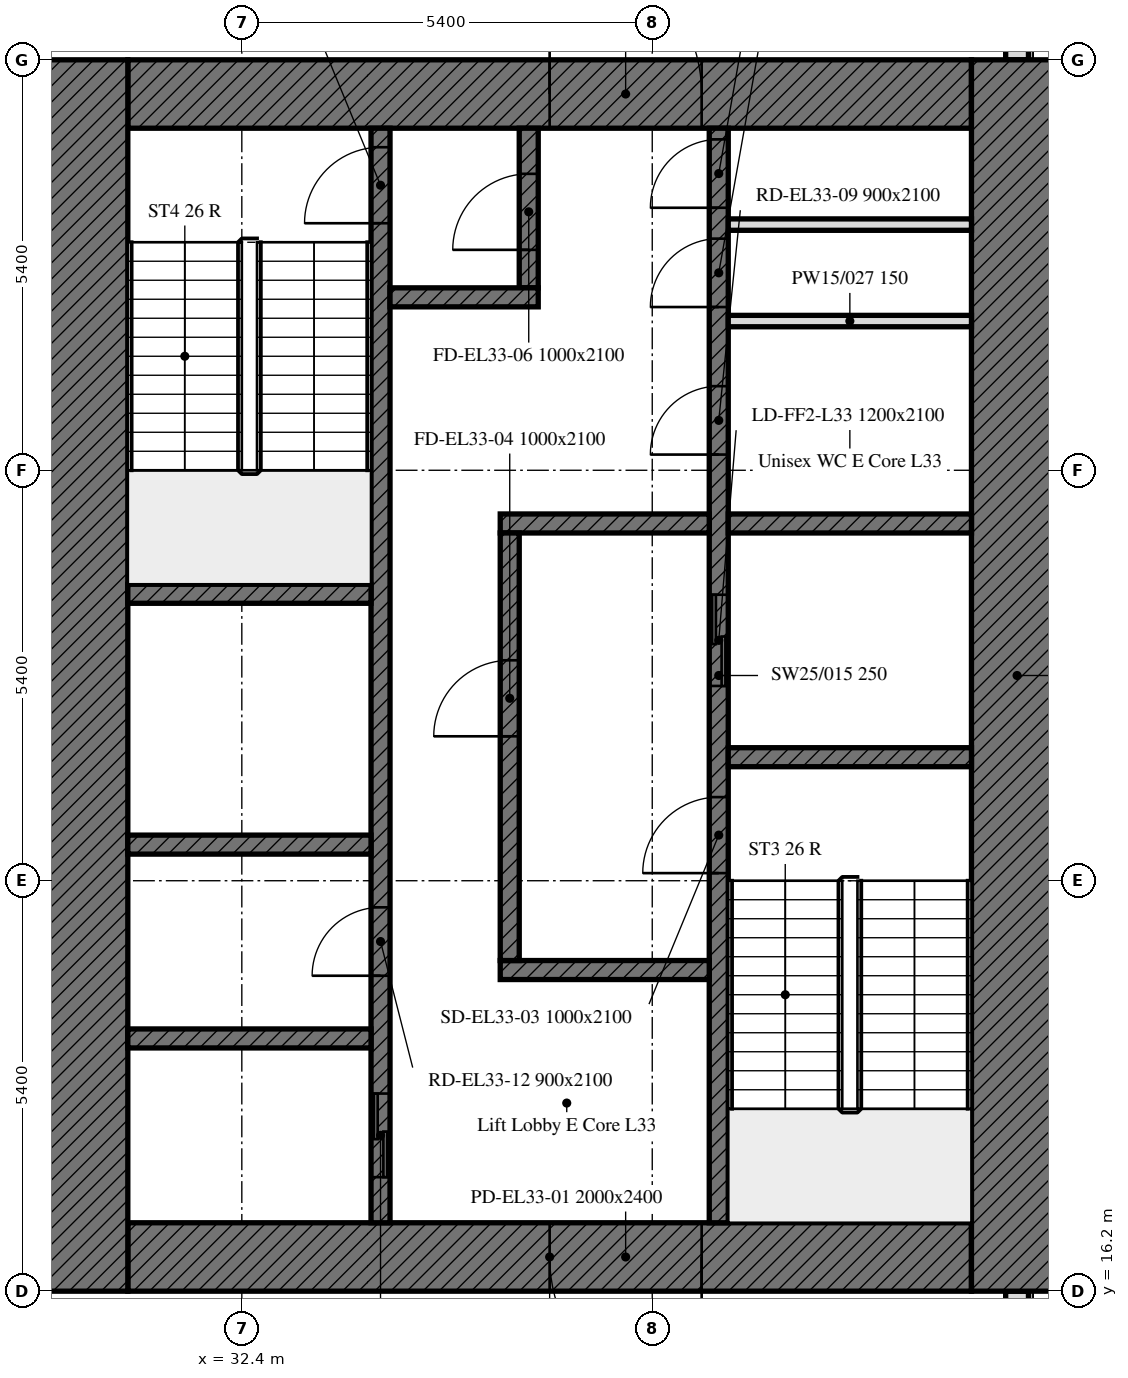
"""IFC4 building model, lengths in metres.
Left out: names, types, materials, properties, quantities, classifications, styles, units other than length and angle.
Written with IfcOpenShell. Run it as: python <this file> out.ifc"""

import sys

from ifc_helpers import new_model, si_unit, direction, frame, frame_2d, origin, place, context, subcontext, project, spatial, rectangle, extrude, element, fill, save


model = new_model("IFC4")
c1 = context("Model", 3, precision=1e-05, world=origin(), true_north=direction((0.0, 1.0)))
c2 = subcontext(c1, "Body", "Model", "MODEL_VIEW")
j1 = project(units=[si_unit("LENGTHUNIT", "METRE"), si_unit("PLANEANGLEUNIT", "RADIAN")], contexts=[c1])
p1 = place(None, origin())
s1 = spatial("IfcSite", under=j1, at=p1, CompositionType="ELEMENT")
p2 = place(p1, origin())
s2 = spatial("IfcBuilding", under=s1, at=p2, CompositionType="ELEMENT")
p3 = place(p2, frame((0.0, 0.0, 143.2)))
s3 = spatial("IfcBuildingStorey", under=s2, at=p3, CompositionType="ELEMENT", Elevation=143.2)
p4 = place(p3, frame((42.6, 10.8, 0.0), z_axis=(0.0, 0.0, 1.0), x_axis=(0.0, 1.0, 0.0)))
e1 = element("IfcWall", 1, at=p4, inside=s3, PredefinedType="SOLIDWALL", context=c2, shape_type="SweptSolid", body=[
    extrude(rectangle(XDim=5.4, YDim=0.3, at=frame_2d((2.7, 0.0))), origin(), (0.0, 0.0, 1.0), 4.5),
])
p5 = place(p4, frame((0.9, 0.0, 0.0)))
e2 = element("IfcOpeningElement", 2, at=p5, cuts=e1, PredefinedType="OPENING", context=c2, shape_type="SweptSolid", body=[
    extrude(rectangle(XDim=1.8, YDim=2.4, at=frame_2d((0.9, 1.2))), frame((0.0, 0.16, 0.0), z_axis=(0.0, -1.0, 0.0), x_axis=(1.0, 0.0, 0.0)), (0.0, 0.0, 1.0), 0.32),
])
p6 = place(p3, frame((42.6, 32.4, 0.0), z_axis=(0.0, 0.0, 1.0), x_axis=(0.0, 1.0, 0.0)))
e3 = element("IfcWall", 3, at=p6, inside=s3, PredefinedType="SOLIDWALL", context=c2, shape_type="SweptSolid", body=[
    extrude(rectangle(XDim=5.214, YDim=0.3, at=frame_2d((2.607, 0.0))), origin(), (0.0, 0.0, 1.0), 4.5),
])
p7 = place(p6, frame((2.7, 0.0, 0.0)))
e4 = element("IfcOpeningElement", 4, at=p7, cuts=e3, PredefinedType="OPENING", context=c2, shape_type="SweptSolid", body=[
    extrude(rectangle(XDim=1.2, YDim=2.4, at=frame_2d((0.6, 1.2))), frame((0.0, 0.16, 0.0), z_axis=(0.0, -1.0, 0.0), x_axis=(1.0, 0.0, 0.0)), (0.0, 0.0, 1.0), 0.32),
])
p8 = place(p3, frame((42.0, 16.65, 0.0), z_axis=(0.0, 0.0, 1.0), x_axis=(-1.0, 0.0, 0.0)))
e5 = element("IfcWall", 5, at=p8, inside=s3, PredefinedType="SOLIDWALL", context=c2, shape_type="SweptSolid", body=[
    extrude(rectangle(XDim=11.1, YDim=0.9, at=frame_2d((5.55, 0.0))), origin(), (0.0, 0.0, 1.0), 4.5),
])
p9 = place(p8, frame((3.55, 0.0, 0.0)))
e6 = element("IfcOpeningElement", 6, at=p9, cuts=e5, PredefinedType="OPENING", context=c2, shape_type="SweptSolid", body=[
    extrude(rectangle(XDim=2.0, YDim=2.4, at=frame_2d((1.0, 1.2))), frame((0.0, 0.45, 0.0), z_axis=(0.0, -1.0, 0.0), x_axis=(1.0, 0.0, 0.0)), (0.0, 0.0, 1.0), 0.9),
])
p10 = place(p3, frame((30.9, 31.95, 0.0), z_axis=(0.0, 0.0, 1.0), x_axis=(1.0, 0.0, 0.0)))
e7 = element("IfcWall", 7, at=p10, inside=s3, PredefinedType="SOLIDWALL", context=c2, shape_type="SweptSolid", body=[
    extrude(rectangle(XDim=11.1, YDim=0.9, at=frame_2d((5.55, 0.0))), origin(), (0.0, 0.0, 1.0), 4.5),
])
p11 = place(p10, frame((5.55, 0.0, 0.0)))
e8 = element("IfcOpeningElement", 8, at=p11, cuts=e7, PredefinedType="OPENING", context=c2, shape_type="SweptSolid", body=[
    extrude(rectangle(XDim=2.0, YDim=2.4, at=frame_2d((1.0, 1.2))), frame((0.0, 0.45, 0.0), z_axis=(0.0, -1.0, 0.0), x_axis=(1.0, 0.0, 0.0)), (0.0, 0.0, 1.0), 0.9),
])
for number, where, z_axis, x_axis in (
    (9, (42.6, 32.4, 0.0), (0.0, 0.0, 1.0), (0.0, -1.0, 0.0)),
    (10, (30.3, 16.2, 0.0), (0.0, 0.0, 1.0), (0.0, 1.0, 0.0)),
):
    element("IfcWall", number, at=place(p3, frame(where, z_axis=z_axis, x_axis=x_axis)), inside=s3, PredefinedType="SOLIDWALL", context=c2, shape_type="SweptSolid", body=[
        extrude(rectangle(XDim=16.2, YDim=1.2, at=frame_2d((8.1, 0.0))), origin(), (0.0, 0.0, 1.0), 4.5),
    ])
p12 = place(p3, frame((38.675, 17.1, 0.0), z_axis=(0.0, 0.0, 1.0), x_axis=(0.0, 1.0, 0.0)))
e11 = element("IfcWall", 11, at=p12, inside=s3, PredefinedType="SOLIDWALL", context=c2, shape_type="SweptSolid", body=[
    extrude(rectangle(XDim=14.4, YDim=0.25, at=frame_2d((7.2, 0.0))), origin(), (0.0, 0.0, 1.0), 4.5),
])
p13 = place(p12, frame((4.6, 0.0, 0.0)))
e12 = element("IfcOpeningElement", 12, at=p13, cuts=e11, PredefinedType="OPENING", context=c2, shape_type="SweptSolid", body=[
    extrude(rectangle(XDim=1.0, YDim=2.1, at=frame_2d((0.5, 1.05))), frame((0.0, 0.125, 0.0), z_axis=(0.0, -1.0, 0.0), x_axis=(1.0, 0.0, 0.0)), (0.0, 0.0, 1.0), 0.25),
])
p14 = place(p12, frame((7.062, 0.0, 0.0)))
e13 = element("IfcOpeningElement", 13, at=p14, cuts=e11, PredefinedType="OPENING", context=c2, shape_type="SweptSolid", body=[
    extrude(rectangle(XDim=1.2, YDim=2.1, at=frame_2d((0.6, 1.05))), frame((0.0, 0.125, 0.0), z_axis=(0.0, -1.0, 0.0), x_axis=(1.0, 0.0, 0.0)), (0.0, 0.0, 1.0), 0.25),
])
p15 = place(p12, frame((10.106, 0.0, 0.0)))
e14 = element("IfcOpeningElement", 14, at=p15, cuts=e11, PredefinedType="OPENING", context=c2, shape_type="SweptSolid", body=[
    extrude(rectangle(XDim=0.9, YDim=2.1, at=frame_2d((0.45, 1.05))), frame((0.0, 0.125, 0.0), z_axis=(0.0, -1.0, 0.0), x_axis=(1.0, 0.0, 0.0)), (0.0, 0.0, 1.0), 0.25),
])
p16 = place(p12, frame((12.048, 0.0, 0.0)))
e15 = element("IfcOpeningElement", 15, at=p16, cuts=e11, PredefinedType="OPENING", context=c2, shape_type="SweptSolid", body=[
    extrude(rectangle(XDim=0.9, YDim=2.1, at=frame_2d((0.45, 1.05))), frame((0.0, 0.125, 0.0), z_axis=(0.0, -1.0, 0.0), x_axis=(1.0, 0.0, 0.0)), (0.0, 0.0, 1.0), 0.25),
])
p17 = place(p12, frame((13.354, 0.0, 0.0)))
e16 = element("IfcOpeningElement", 16, at=p17, cuts=e11, PredefinedType="OPENING", context=c2, shape_type="SweptSolid", body=[
    extrude(rectangle(XDim=0.9, YDim=2.1, at=frame_2d((0.45, 1.05))), frame((0.0, 0.125, 0.0), z_axis=(0.0, -1.0, 0.0), x_axis=(1.0, 0.0, 0.0)), (0.0, 0.0, 1.0), 0.25),
])
p18 = place(p3, frame((34.225, 17.1, 0.0), z_axis=(0.0, 0.0, 1.0), x_axis=(0.0, 1.0, 0.0)))
e17 = element("IfcWall", 17, at=p18, inside=s3, PredefinedType="SOLIDWALL", context=c2, shape_type="SweptSolid", body=[
    extrude(rectangle(XDim=14.4, YDim=0.25, at=frame_2d((7.2, 0.0))), origin(), (0.0, 0.0, 1.0), 4.5),
])
p19 = place(p18, frame((13.15, 0.0, 0.0)))
e18 = element("IfcOpeningElement", 18, at=p19, cuts=e17, PredefinedType="OPENING", context=c2, shape_type="SweptSolid", body=[
    extrude(rectangle(XDim=1.0, YDim=2.1, at=frame_2d((0.5, 1.05))), frame((0.0, 0.125, 0.0), z_axis=(0.0, -1.0, 0.0), x_axis=(1.0, 0.0, 0.0)), (0.0, 0.0, 1.0), 0.25),
])
p20 = place(p18, frame((0.6, 0.0, 0.0)))
e19 = element("IfcOpeningElement", 19, at=p20, cuts=e17, PredefinedType="OPENING", context=c2, shape_type="SweptSolid", body=[
    extrude(rectangle(XDim=1.1, YDim=2.1, at=frame_2d((0.55, 1.05))), frame((0.0, 0.125, 0.0), z_axis=(0.0, -1.0, 0.0), x_axis=(1.0, 0.0, 0.0)), (0.0, 0.0, 1.0), 0.25),
])
p21 = place(p18, frame((3.25, 0.0, 0.0)))
e20 = element("IfcOpeningElement", 20, at=p21, cuts=e17, PredefinedType="OPENING", context=c2, shape_type="SweptSolid", body=[
    extrude(rectangle(XDim=0.9, YDim=2.1, at=frame_2d((0.45, 1.05))), frame((0.0, 0.125, 0.0), z_axis=(0.0, -1.0, 0.0), x_axis=(1.0, 0.0, 0.0)), (0.0, 0.0, 1.0), 0.25),
])
p22 = place(p3, frame((38.8, 23.225, 0.0), z_axis=(0.0, 0.0, 1.0), x_axis=(1.0, 0.0, 0.0)))
e21 = element("IfcWall", 21, at=p22, inside=s3, PredefinedType="SOLIDWALL", context=c2, shape_type="SweptSolid", body=[
    extrude(rectangle(XDim=3.2, YDim=0.25, at=frame_2d((1.6, 0.0))), origin(), (0.0, 0.0, 1.0), 4.5),
])
for number, where, z_axis, x_axis in (
    (22, (30.9, 25.375, 0.0), (0.0, 0.0, 1.0), (1.0, 0.0, 0.0)),
    (23, (30.9, 22.075, 0.0), (0.0, 0.0, 1.0), (1.0, 0.0, 0.0)),
):
    element("IfcWall", number, at=place(p3, frame(where, z_axis=z_axis, x_axis=x_axis)), inside=s3, PredefinedType="SOLIDWALL", context=c2, shape_type="SweptSolid", body=[
        extrude(rectangle(XDim=3.2, YDim=0.25, at=frame_2d((1.6, 0.0))), origin(), (0.0, 0.0, 1.0), 4.5),
    ])
p23 = place(p3, frame((38.8, 26.3, 0.0), z_axis=(0.0, 0.0, 1.0), x_axis=(1.0, 0.0, 0.0)))
e24 = element("IfcWall", 24, at=p23, inside=s3, PredefinedType="SOLIDWALL", context=c2, shape_type="SweptSolid", body=[
    extrude(rectangle(XDim=3.2, YDim=0.25, at=frame_2d((1.6, 0.0))), origin(), (0.0, 0.0, 1.0), 4.5),
])
for number, where, z_axis, x_axis in (
    (25, (35.8, 26.3, 0.0), (0.0, 0.0, 1.0), (1.0, 0.0, 0.0)),
    (26, (35.8, 20.425, 0.0), (0.0, 0.0, 1.0), (1.0, 0.0, 0.0)),
):
    element("IfcWall", number, at=place(p3, frame(where, z_axis=z_axis, x_axis=x_axis)), inside=s3, PredefinedType="SOLIDWALL", context=c2, shape_type="SweptSolid", body=[
        extrude(rectangle(XDim=2.75, YDim=0.25, at=frame_2d((1.375, 0.0))), origin(), (0.0, 0.0, 1.0), 4.5),
    ])
p24 = place(p3, frame((36.175, 29.4, 0.0), z_axis=(0.0, 0.0, 1.0), x_axis=(0.0, 1.0, 0.0)))
e27 = element("IfcWall", 27, at=p24, inside=s3, PredefinedType="SOLIDWALL", context=c2, shape_type="SweptSolid", body=[
    extrude(rectangle(XDim=2.1, YDim=0.25, at=frame_2d((1.05, 0.0))), origin(), (0.0, 0.0, 1.0), 4.5),
])
p25 = place(p24, frame((0.5, 0.0, 0.0)))
e28 = element("IfcOpeningElement", 28, at=p25, cuts=e27, PredefinedType="OPENING", context=c2, shape_type="SweptSolid", body=[
    extrude(rectangle(XDim=1.0, YDim=2.1, at=frame_2d((0.5, 1.05))), frame((0.0, 0.125, 0.0), z_axis=(0.0, -1.0, 0.0), x_axis=(1.0, 0.0, 0.0)), (0.0, 0.0, 1.0), 0.25),
])
p26 = place(p3, frame((34.35, 29.275, 0.0), z_axis=(0.0, 0.0, 1.0), x_axis=(1.0, 0.0, 0.0)))
e29 = element("IfcWall", 29, at=p26, inside=s3, PredefinedType="SOLIDWALL", context=c2, shape_type="SweptSolid", body=[
    extrude(rectangle(XDim=1.95, YDim=0.25, at=frame_2d((0.975, 0.0))), origin(), (0.0, 0.0, 1.0), 4.5),
])
p27 = place(p3, frame((35.925, 20.55, 0.0), z_axis=(0.0, 0.0, 1.0), x_axis=(0.0, 1.0, 0.0)))
e30 = element("IfcWall", 30, at=p27, inside=s3, PredefinedType="SOLIDWALL", context=c2, shape_type="SweptSolid", body=[
    extrude(rectangle(XDim=5.625, YDim=0.25, at=frame_2d((2.812, 0.0))), origin(), (0.0, 0.0, 1.0), 4.5),
])
p28 = place(p27, frame((2.95, 0.0, 0.0)))
e31 = element("IfcOpeningElement", 31, at=p28, cuts=e30, PredefinedType="OPENING", context=c2, shape_type="SweptSolid", body=[
    extrude(rectangle(XDim=1.0, YDim=2.1, at=frame_2d((0.5, 1.05))), frame((0.0, 0.125, 0.0), z_axis=(0.0, -1.0, 0.0), x_axis=(1.0, 0.0, 0.0)), (0.0, 0.0, 1.0), 0.25),
])
p29 = place(p3, frame((30.9, 19.525, 0.0), z_axis=(0.0, 0.0, 1.0), x_axis=(1.0, 0.0, 0.0)))
e32 = element("IfcWall", 32, at=p29, inside=s3, PredefinedType="SOLIDWALL", context=c2, shape_type="SweptSolid", body=[
    extrude(rectangle(XDim=3.2, YDim=0.25, at=frame_2d((1.6, 0.0))), origin(), (0.0, 0.0, 1.0), 4.5),
])
for number, where, z_axis, x_axis in (
    (33, (38.8, 28.963, 0.0), (0.0, 0.0, 1.0), (1.0, 0.0, 0.0)),
    (34, (38.8, 30.232, 0.0), (0.0, 0.0, 1.0), (1.0, 0.0, 0.0)),
):
    element("IfcWall", number, at=place(p3, frame(where, z_axis=z_axis, x_axis=x_axis)), inside=s3, PredefinedType="PARTITIONING", context=c2, shape_type="SweptSolid", body=[
        extrude(rectangle(XDim=3.2, YDim=0.15, at=frame_2d((1.6, 0.0))), origin(), (0.0, 0.0, 1.0), 4.5),
    ])
p30 = place(p9, origin())
e35 = element("IfcDoor", 35, at=p30, inside=s3, OperationType="DOUBLE_DOOR_SINGLE_SWING", PredefinedType="DOOR", context=c2, shape_type="SweptSolid", body=[
    extrude(rectangle(XDim=2.0, YDim=2.4, at=frame_2d((1.0, 1.2))), frame((0.0, 0.025, 0.0), z_axis=(0.0, -1.0, 0.0), x_axis=(1.0, 0.0, 0.0)), (0.0, 0.0, 1.0), 0.05),
])
fill(e6, e35)
p31 = place(p11, origin())
e36 = element("IfcDoor", 36, at=p31, inside=s3, OperationType="DOUBLE_DOOR_SINGLE_SWING", PredefinedType="DOOR", context=c2, shape_type="SweptSolid", body=[
    extrude(rectangle(XDim=2.0, YDim=2.4, at=frame_2d((1.0, 1.2))), frame((0.0, 0.025, 0.0), z_axis=(0.0, -1.0, 0.0), x_axis=(1.0, 0.0, 0.0)), (0.0, 0.0, 1.0), 0.05),
])
fill(e8, e36)
p32 = place(p13, origin())
e37 = element("IfcDoor", 37, at=p32, inside=s3, OperationType="SINGLE_SWING_LEFT", PredefinedType="DOOR", context=c2, shape_type="SweptSolid", body=[
    extrude(rectangle(XDim=1.0, YDim=2.1, at=frame_2d((0.5, 1.05))), frame((0.0, 0.025, 0.0), z_axis=(0.0, -1.0, 0.0), x_axis=(1.0, 0.0, 0.0)), (0.0, 0.0, 1.0), 0.05),
])
fill(e12, e37)
p33 = place(p28, origin())
e38 = element("IfcDoor", 38, at=p33, inside=s3, OperationType="SINGLE_SWING_LEFT", PredefinedType="DOOR", context=c2, shape_type="SweptSolid", body=[
    extrude(rectangle(XDim=1.0, YDim=2.1, at=frame_2d((0.5, 1.05))), frame((0.0, 0.025, 0.0), z_axis=(0.0, -1.0, 0.0), x_axis=(1.0, 0.0, 0.0)), (0.0, 0.0, 1.0), 0.05),
])
fill(e31, e38)
p34 = place(p19, origin())
e39 = element("IfcDoor", 39, at=p34, inside=s3, OperationType="SINGLE_SWING_LEFT", PredefinedType="DOOR", context=c2, shape_type="SweptSolid", body=[
    extrude(rectangle(XDim=1.0, YDim=2.1, at=frame_2d((0.5, 1.05))), frame((0.0, 0.025, 0.0), z_axis=(0.0, -1.0, 0.0), x_axis=(1.0, 0.0, 0.0)), (0.0, 0.0, 1.0), 0.05),
])
fill(e18, e39)
p35 = place(p25, origin())
e40 = element("IfcDoor", 40, at=p35, inside=s3, OperationType="SINGLE_SWING_LEFT", PredefinedType="DOOR", context=c2, shape_type="SweptSolid", body=[
    extrude(rectangle(XDim=1.0, YDim=2.1, at=frame_2d((0.5, 1.05))), frame((0.0, 0.025, 0.0), z_axis=(0.0, -1.0, 0.0), x_axis=(1.0, 0.0, 0.0)), (0.0, 0.0, 1.0), 0.05),
])
fill(e28, e40)
p36 = place(p14, origin())
e41 = element("IfcDoor", 41, at=p36, inside=s3, OperationType="DOUBLE_DOOR_SLIDING", PredefinedType="DOOR", context=c2, shape_type="SweptSolid", body=[
    extrude(rectangle(XDim=1.2, YDim=2.1, at=frame_2d((0.6, 1.05))), frame((0.0, 0.025, 0.0), z_axis=(0.0, -1.0, 0.0), x_axis=(1.0, 0.0, 0.0)), (0.0, 0.0, 1.0), 0.05),
])
fill(e13, e41)
p37 = place(p20, origin())
e42 = element("IfcDoor", 42, at=p37, inside=s3, OperationType="DOUBLE_DOOR_SLIDING", PredefinedType="DOOR", context=c2, shape_type="SweptSolid", body=[
    extrude(rectangle(XDim=1.1, YDim=2.1, at=frame_2d((0.55, 1.05))), frame((0.0, 0.025, 0.0), z_axis=(0.0, -1.0, 0.0), x_axis=(1.0, 0.0, 0.0)), (0.0, 0.0, 1.0), 0.05),
])
fill(e19, e42)
p38 = place(p15, origin())
e43 = element("IfcDoor", 43, at=p38, inside=s3, OperationType="SINGLE_SWING_LEFT", PredefinedType="DOOR", context=c2, shape_type="SweptSolid", body=[
    extrude(rectangle(XDim=0.9, YDim=2.1, at=frame_2d((0.45, 1.05))), frame((0.0, 0.025, 0.0), z_axis=(0.0, -1.0, 0.0), x_axis=(1.0, 0.0, 0.0)), (0.0, 0.0, 1.0), 0.05),
])
fill(e14, e43)
p39 = place(p16, origin())
e44 = element("IfcDoor", 44, at=p39, inside=s3, OperationType="SINGLE_SWING_LEFT", PredefinedType="DOOR", context=c2, shape_type="SweptSolid", body=[
    extrude(rectangle(XDim=0.9, YDim=2.1, at=frame_2d((0.45, 1.05))), frame((0.0, 0.025, 0.0), z_axis=(0.0, -1.0, 0.0), x_axis=(1.0, 0.0, 0.0)), (0.0, 0.0, 1.0), 0.05),
])
fill(e15, e44)
p40 = place(p17, origin())
e45 = element("IfcDoor", 45, at=p40, inside=s3, OperationType="SINGLE_SWING_LEFT", PredefinedType="DOOR", context=c2, shape_type="SweptSolid", body=[
    extrude(rectangle(XDim=0.9, YDim=2.1, at=frame_2d((0.45, 1.05))), frame((0.0, 0.025, 0.0), z_axis=(0.0, -1.0, 0.0), x_axis=(1.0, 0.0, 0.0)), (0.0, 0.0, 1.0), 0.05),
])
fill(e16, e45)
p41 = place(p21, origin())
e46 = element("IfcDoor", 46, at=p41, inside=s3, OperationType="SINGLE_SWING_LEFT", PredefinedType="DOOR", context=c2, shape_type="SweptSolid", body=[
    extrude(rectangle(XDim=0.9, YDim=2.1, at=frame_2d((0.45, 1.05))), frame((0.0, 0.025, 0.0), z_axis=(0.0, -1.0, 0.0), x_axis=(1.0, 0.0, 0.0)), (0.0, 0.0, 1.0), 0.05),
])
fill(e20, e46)
save(model, sys.argv[1])
